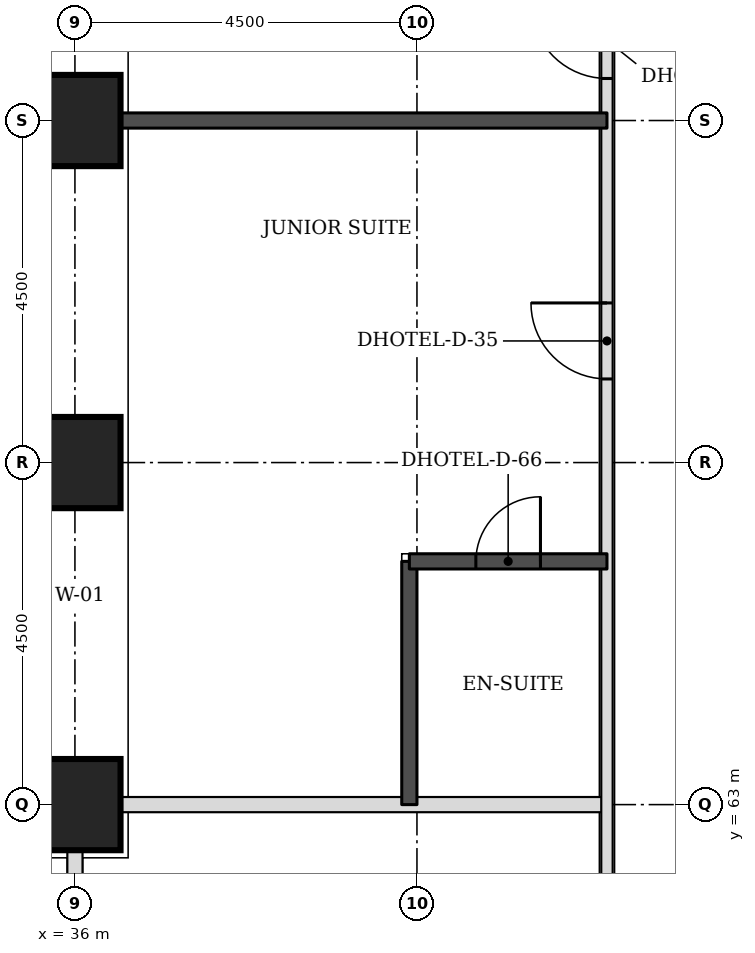
"""IFC4 building model, lengths in metres.
Left out: names, types, materials, properties, quantities, classifications, styles, units other than length and angle.
Written with IfcOpenShell. Run it as: python <this file> out.ifc"""

import sys

from ifc_helpers import new_model, si_unit, direction, frame, frame_2d, origin, origin_2d, place, context, subcontext, project, spatial, rectangle, extrude, element, fill, save


model = new_model("IFC4")
c1 = context("Model", 3, precision=1e-05, world=origin(), true_north=direction((0.0, 1.0)))
c2 = subcontext(c1, "Body", "Model", "MODEL_VIEW")
j1 = project(units=[si_unit("LENGTHUNIT", "METRE"), si_unit("PLANEANGLEUNIT", "RADIAN")], contexts=[c1])
p1 = place(None, origin())
s1 = spatial("IfcSite", under=j1, at=p1, CompositionType="ELEMENT")
p2 = place(p1, origin())
s2 = spatial("IfcBuilding", under=s1, at=p2, CompositionType="ELEMENT")
p3 = place(p2, frame((0.0, 0.0, 36.3)))
s3 = spatial("IfcBuildingStorey", under=s2, at=p3, CompositionType="ELEMENT", Elevation=36.3)
for number, where, z_axis, x_axis in (
    (1, (36.0, 63.0, 0.0), (0.0, 0.0, 1.0), (1.0, 0.0, 0.0)),
    (2, (36.0, 67.5, 0.0), (0.0, 0.0, 1.0), (1.0, 0.0, 0.0)),
    (3, (36.0, 72.0, 0.0), (0.0, 0.0, 1.0), (1.0, 0.0, 0.0)),
):
    element("IfcColumn", number, at=place(p3, frame(where, z_axis=z_axis, x_axis=x_axis)), inside=s3, PredefinedType="COLUMN", context=c2, shape_type="SweptSolid", body=[
        extrude(rectangle(XDim=1.2, YDim=1.2, at=origin_2d()), origin(), (0.0, 0.0, 1.0), 3.3),
    ])
p4 = place(p3, frame((36.0, 57.35, 0.0), z_axis=(0.0, 0.0, 1.0), x_axis=(0.0, 1.0, 0.0)))
e4 = element("IfcWall", 4, at=p4, inside=s3, PredefinedType="PARTITIONING", context=c2, shape_type="SweptSolid", body=[
    extrude(rectangle(XDim=5.05, YDim=0.2, at=frame_2d((2.525, 0.0))), origin(), (0.0, 0.0, 1.0), 2.33),
])
p5 = place(p3, frame((36.6, 63.0, 0.0), z_axis=(0.0, 0.0, 1.0), x_axis=(1.0, 0.0, 0.0)))
e5 = element("IfcWall", 5, at=p5, inside=s3, PredefinedType="PARTITIONING", context=c2, shape_type="SweptSolid", body=[
    extrude(rectangle(XDim=6.4, YDim=0.2, at=frame_2d((3.2, 0.0))), origin(), (0.0, 0.0, 1.0), 3.08),
])
p6 = place(p3, frame((43.0, 57.35, 0.0), z_axis=(0.0, 0.0, 1.0), x_axis=(0.0, 1.0, 0.0)))
e6 = element("IfcWall", 6, at=p6, inside=s3, PredefinedType="PARTITIONING", context=c2, shape_type="SweptSolid", body=[
    extrude(rectangle(XDim=16.65, YDim=0.15, at=frame_2d((8.325, 0.0))), origin(), (0.0, 0.0, 1.0), 3.08),
])
p7 = place(p6, frame((11.25, 0.0, 0.0)))
e7 = element("IfcOpeningElement", 7, at=p7, cuts=e6, PredefinedType="OPENING", context=c2, shape_type="SweptSolid", body=[
    extrude(rectangle(XDim=1.0, YDim=2.1, at=frame_2d((0.5, 1.05))), frame((0.0, 0.085, 0.0), z_axis=(0.0, -1.0, 0.0), x_axis=(1.0, 0.0, 0.0)), (0.0, 0.0, 1.0), 0.17),
])
p8 = place(p6, frame((15.203, 0.0, 0.0)))
e8 = element("IfcOpeningElement", 8, at=p8, cuts=e6, PredefinedType="OPENING", context=c2, shape_type="SweptSolid", body=[
    extrude(rectangle(XDim=1.0, YDim=2.1, at=frame_2d((0.5, 1.05))), frame((0.0, 0.085, 0.0), z_axis=(0.0, -1.0, 0.0), x_axis=(1.0, 0.0, 0.0)), (0.0, 0.0, 1.0), 0.17),
])
p9 = place(p3, frame((40.4, 63.0, 0.0), z_axis=(0.0, 0.0, 1.0), x_axis=(0.0, 1.0, 0.0)))
e9 = element("IfcWall", 9, at=p9, inside=s3, PredefinedType="SOLIDWALL", context=c2, shape_type="SweptSolid", body=[
    extrude(rectangle(XDim=3.2, YDim=0.2, at=frame_2d((1.6, 0.0))), origin(), (0.0, 0.0, 1.0), 3.08),
])
p10 = place(p3, frame((40.4, 66.2, 0.0), z_axis=(0.0, 0.0, 1.0), x_axis=(1.0, 0.0, 0.0)))
e10 = element("IfcWall", 10, at=p10, inside=s3, PredefinedType="SOLIDWALL", context=c2, shape_type="SweptSolid", body=[
    extrude(rectangle(XDim=2.6, YDim=0.2, at=frame_2d((1.3, 0.0))), origin(), (0.0, 0.0, 1.0), 3.08),
])
p11 = place(p10, frame((0.875, 0.0, 0.0)))
e11 = element("IfcOpeningElement", 11, at=p11, cuts=e10, PredefinedType="OPENING", context=c2, shape_type="SweptSolid", body=[
    extrude(rectangle(XDim=0.85, YDim=2.1, at=frame_2d((0.425, 1.05))), frame((0.0, 0.11, 0.0), z_axis=(0.0, -1.0, 0.0), x_axis=(1.0, 0.0, 0.0)), (0.0, 0.0, 1.0), 0.22),
])
p12 = place(p3, frame((36.6, 72.0, 0.0), z_axis=(0.0, 0.0, 1.0), x_axis=(1.0, 0.0, 0.0)))
e12 = element("IfcWall", 12, at=p12, inside=s3, PredefinedType="SOLIDWALL", context=c2, shape_type="SweptSolid", body=[
    extrude(rectangle(XDim=6.4, YDim=0.2, at=frame_2d((3.2, 0.0))), origin(), (0.0, 0.0, 1.0), 3.08),
])
p13 = place(p7, origin())
e13 = element("IfcDoor", 13, at=p13, inside=s3, OperationType="SINGLE_SWING_RIGHT", PredefinedType="DOOR", context=c2, shape_type="SweptSolid", body=[
    extrude(rectangle(XDim=1.0, YDim=2.1, at=frame_2d((0.5, 1.05))), frame((0.0, 0.025, 0.0), z_axis=(0.0, -1.0, 0.0), x_axis=(1.0, 0.0, 0.0)), (0.0, 0.0, 1.0), 0.05),
])
fill(e7, e13)
p14 = place(p11, origin())
e14 = element("IfcDoor", 14, at=p14, inside=s3, OperationType="SINGLE_SWING_RIGHT", PredefinedType="DOOR", context=c2, shape_type="SweptSolid", body=[
    extrude(rectangle(XDim=0.85, YDim=2.1, at=frame_2d((0.425, 1.05))), frame((0.0, 0.025, 0.0), z_axis=(0.0, -1.0, 0.0), x_axis=(1.0, 0.0, 0.0)), (0.0, 0.0, 1.0), 0.05),
])
fill(e11, e14)
p15 = place(p8, origin())
e15 = element("IfcDoor", 15, at=p15, inside=s3, OperationType="SINGLE_SWING_RIGHT", PredefinedType="DOOR", context=c2, shape_type="SweptSolid", body=[
    extrude(rectangle(XDim=1.0, YDim=2.1, at=frame_2d((0.5, 1.05))), frame((0.0, 0.025, 0.0), z_axis=(0.0, -1.0, 0.0), x_axis=(1.0, 0.0, 0.0)), (0.0, 0.0, 1.0), 0.05),
])
fill(e8, e15)
save(model, sys.argv[1])
